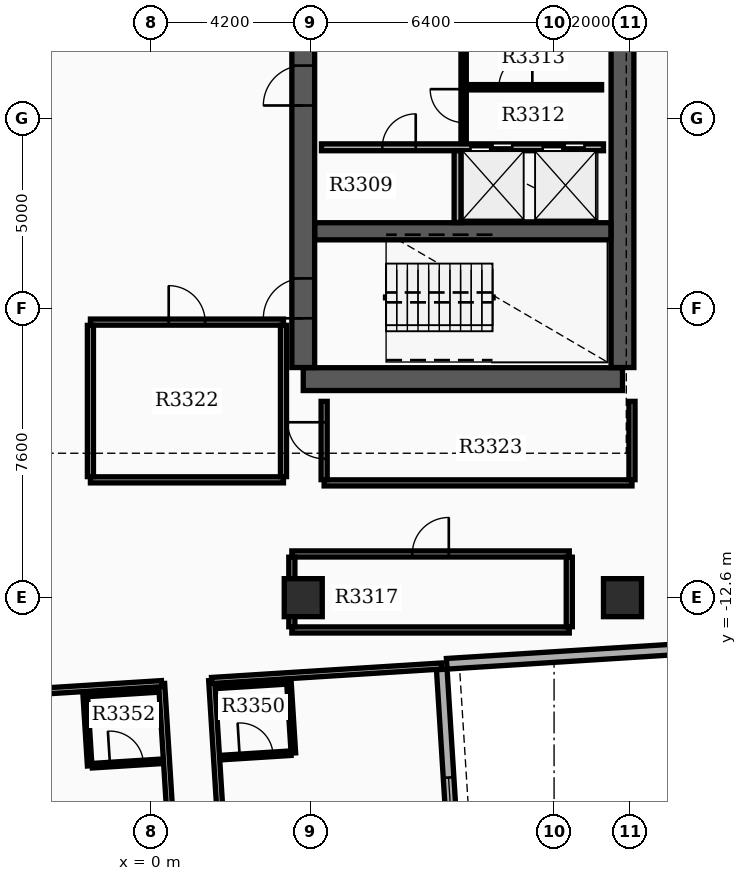
"""IFC4 building model, lengths in metres.
Left out: names, types, materials, properties, quantities, classifications, styles, units other than length and angle.
Written with IfcOpenShell. Run it as: python <this file> out.ifc"""

import sys

from ifc_helpers import new_model, si_unit, direction, frame, frame_2d, origin, origin_2d, place, context, subcontext, project, spatial, rectangle, extrude, element, fill, save


model = new_model("IFC4")
c1 = context("Model", 3, precision=1e-05, world=origin(), true_north=direction((0.0, 1.0)))
c2 = subcontext(c1, "Body", "Model", "MODEL_VIEW")
j1 = project(units=[si_unit("LENGTHUNIT", "METRE"), si_unit("PLANEANGLEUNIT", "RADIAN")], contexts=[c1])
p1 = place(None, origin())
s1 = spatial("IfcSite", under=j1, at=p1, CompositionType="ELEMENT")
p2 = place(p1, origin())
s2 = spatial("IfcBuilding", under=s1, at=p2, CompositionType="ELEMENT")
p3 = place(p2, frame((0.0, 0.0, 209.1)))
s3 = spatial("IfcBuildingStorey", under=s2, at=p3, CompositionType="ELEMENT", Elevation=209.1)
p4 = place(p3, frame((4.0, -6.85, 0.0), z_axis=(0.0, 0.0, 1.0), x_axis=(1.0, 0.0, 0.0)))
e1 = element("IfcWall", 1, at=p4, inside=s3, PredefinedType="SHEAR", context=c2, shape_type="SweptSolid", body=[
    extrude(rectangle(XDim=8.4, YDim=0.6, at=frame_2d((4.2, 0.0))), origin(), (0.0, 0.0, 1.0), 3.7),
])
p5 = place(p3, frame((4.0, -6.545, 0.0), z_axis=(0.0, 0.0, 1.0), x_axis=(0.0, 1.0, 0.0)))
e2 = element("IfcWall", 2, at=p5, inside=s3, PredefinedType="SHEAR", context=c2, shape_type="SweptSolid", body=[
    extrude(rectangle(XDim=11.19, YDim=0.6, at=frame_2d((5.595, 0.0))), origin(), (0.0, 0.0, 1.0), 3.7),
])
p6 = place(p5, frame((1.295, 0.0, 0.0)))
e3 = element("IfcOpeningElement", 3, at=p6, cuts=e2, PredefinedType="OPENING", context=c2, shape_type="SweptSolid", body=[
    extrude(rectangle(XDim=1.05, YDim=2.15, at=frame_2d((0.525, 1.075))), frame((0.0, 0.31, 0.0), z_axis=(0.0, -1.0, 0.0), x_axis=(1.0, 0.0, 0.0)), (0.0, 0.0, 1.0), 0.62),
])
p7 = place(p5, frame((6.895, 0.0, 0.0)))
e4 = element("IfcOpeningElement", 4, at=p7, cuts=e2, PredefinedType="OPENING", context=c2, shape_type="SweptSolid", body=[
    extrude(rectangle(XDim=1.05, YDim=2.15, at=frame_2d((0.525, 1.075))), frame((0.0, 0.31, 0.0), z_axis=(0.0, -1.0, 0.0), x_axis=(1.0, 0.0, 0.0)), (0.0, 0.0, 1.0), 0.62),
])
p8 = place(p3, frame((12.4, -6.545, 0.0), z_axis=(0.0, 0.0, 1.0), x_axis=(0.0, 1.0, 0.0)))
e5 = element("IfcWall", 5, at=p8, inside=s3, PredefinedType="SHEAR", context=c2, shape_type="SweptSolid", body=[
    extrude(rectangle(XDim=11.19, YDim=0.6, at=frame_2d((5.595, 0.0))), origin(), (0.0, 0.0, 1.0), 3.7),
])
p9 = place(p3, frame((4.305, -2.96, 0.0), z_axis=(0.0, 0.0, 1.0), x_axis=(1.0, 0.0, 0.0)))
e6 = element("IfcWall", 6, at=p9, inside=s3, PredefinedType="SHEAR", context=c2, shape_type="SweptSolid", body=[
    extrude(rectangle(XDim=7.79, YDim=0.45, at=frame_2d((3.895, 0.0))), origin(), (0.0, 0.0, 1.0), 3.7),
])
for number, where, z_axis, x_axis in (
    (7, (12.4, -12.6, 0.0), (0.0, 0.0, 1.0), (1.0, 0.0, 0.0)),
    (8, (4.0, -12.6, 0.0), (0.0, 0.0, 1.0), (1.0, 0.0, 0.0)),
):
    element("IfcColumn", number, at=place(p3, frame(where, z_axis=z_axis, x_axis=x_axis)), inside=s3, PredefinedType="COLUMN", context=c2, shape_type="SweptSolid", body=[
        extrude(rectangle(XDim=1.0, YDim=1.0, at=origin_2d()), origin(), (0.0, 0.0, 1.0), 3.9),
    ])
p10 = place(p3, frame((8.568, -29.16, 0.0), z_axis=(0.0, 0.0, 1.0), x_axis=(-0.062794967833, 0.998026448555, 0.0)))
e9 = element("IfcWall", 9, at=p10, inside=s3, PredefinedType="STANDARD", context=c2, shape_type="SweptSolid", body=[
    extrude(rectangle(XDim=14.7, YDim=0.28, at=frame_2d((7.35, 0.0))), origin(), (0.0, 0.0, 1.0), 3.18),
])
p11 = place(p10, frame((0.85, 0.0, 0.8)))
e10 = element("IfcOpeningElement", 10, at=p11, cuts=e9, PredefinedType="OPENING", context=c2, shape_type="SweptSolid", body=[
    extrude(rectangle(XDim=1.4, YDim=1.6, at=frame_2d((0.7, 0.8))), frame((0.0, 0.15, 0.0), z_axis=(0.0, -1.0, 0.0), x_axis=(1.0, 0.0, 0.0)), (0.0, 0.0, 1.0), 0.3),
])
p12 = place(p10, frame((4.05, 0.0, 0.8)))
e11 = element("IfcOpeningElement", 11, at=p12, cuts=e9, PredefinedType="OPENING", context=c2, shape_type="SweptSolid", body=[
    extrude(rectangle(XDim=1.4, YDim=1.6, at=frame_2d((0.7, 0.8))), frame((0.0, 0.15, 0.0), z_axis=(0.0, -1.0, 0.0), x_axis=(1.0, 0.0, 0.0)), (0.0, 0.0, 1.0), 0.3),
])
p13 = place(p10, frame((7.25, 0.0, 0.8)))
e12 = element("IfcOpeningElement", 12, at=p13, cuts=e9, PredefinedType="OPENING", context=c2, shape_type="SweptSolid", body=[
    extrude(rectangle(XDim=1.4, YDim=1.6, at=frame_2d((0.7, 0.8))), frame((0.0, 0.15, 0.0), z_axis=(0.0, -1.0, 0.0), x_axis=(1.0, 0.0, 0.0)), (0.0, 0.0, 1.0), 0.3),
])
p14 = place(p10, frame((10.45, 0.0, 0.8)))
e13 = element("IfcOpeningElement", 13, at=p14, cuts=e9, PredefinedType="OPENING", context=c2, shape_type="SweptSolid", body=[
    extrude(rectangle(XDim=1.4, YDim=1.6, at=frame_2d((0.7, 0.8))), frame((0.0, 0.15, 0.0), z_axis=(0.0, -1.0, 0.0), x_axis=(1.0, 0.0, 0.0)), (0.0, 0.0, 1.0), 0.3),
])
p15 = place(p3, frame((14.063, -13.945, 0.0), z_axis=(0.0, 0.0, 1.0), x_axis=(-0.998027314704, -0.062781200242, 0.0)))
e14 = element("IfcWall", 14, at=p15, inside=s3, PredefinedType="STANDARD", context=c2, shape_type="SweptSolid", body=[
    extrude(rectangle(XDim=6.3, YDim=0.28, at=frame_2d((3.15, 0.0))), origin(), (0.0, 0.0, 1.0), 3.18),
])
p16 = place(p3, frame((4.48, -0.75, 0.0), z_axis=(0.0, 0.0, 1.0), x_axis=(1.0, 0.0, 0.0)))
e15 = element("IfcWall", 15, at=p16, inside=s3, PredefinedType="SOLIDWALL", context=c2, shape_type="SweptSolid", body=[
    extrude(rectangle(XDim=7.42, YDim=0.18, at=frame_2d((3.71, 0.0))), origin(), (0.0, 0.0, 1.0), 3.17),
])
p17 = place(p16, frame((3.92, 0.0, 0.0)))
e16 = element("IfcOpeningElement", 16, at=p17, cuts=e15, PredefinedType="OPENING", context=c2, shape_type="SweptSolid", body=[
    extrude(rectangle(XDim=1.1, YDim=2.15, at=frame_2d((0.55, 1.075))), frame((0.0, 0.1, 0.0), z_axis=(0.0, -1.0, 0.0), x_axis=(1.0, 0.0, 0.0)), (0.0, 0.0, 1.0), 0.2),
])
p18 = place(p16, frame((5.82, 0.0, 0.0)))
e17 = element("IfcOpeningElement", 17, at=p18, cuts=e15, PredefinedType="OPENING", context=c2, shape_type="SweptSolid", body=[
    extrude(rectangle(XDim=1.1, YDim=2.15, at=frame_2d((0.55, 1.075))), frame((0.0, 0.1, 0.0), z_axis=(0.0, -1.0, 0.0), x_axis=(1.0, 0.0, 0.0)), (0.0, 0.0, 1.0), 0.2),
])
p19 = place(p16, frame((1.6, 0.0, 0.0)))
e18 = element("IfcOpeningElement", 18, at=p19, cuts=e15, PredefinedType="OPENING", context=c2, shape_type="SweptSolid", body=[
    extrude(rectangle(XDim=0.88, YDim=2.1, at=frame_2d((0.44, 1.05))), frame((0.0, 0.1, 0.0), z_axis=(0.0, -1.0, 0.0), x_axis=(1.0, 0.0, 0.0)), (0.0, 0.0, 1.0), 0.2),
])
p20 = place(p3, frame((8.06, -2.73, 0.0), z_axis=(0.0, 0.0, 1.0), x_axis=(0.0, 1.0, 0.0)))
e19 = element("IfcWall", 19, at=p20, inside=s3, PredefinedType="SOLIDWALL", context=c2, shape_type="SweptSolid", body=[
    extrude(rectangle(XDim=1.89, YDim=0.18, at=frame_2d((0.945, 0.0))), origin(), (0.0, 0.0, 1.0), 3.17),
])
p21 = place(p3, frame((8.22, -0.65, 0.0), z_axis=(0.0, 0.0, 1.0), x_axis=(0.0, 1.0, 0.0)))
e20 = element("IfcWall", 20, at=p21, inside=s3, PredefinedType="SOLIDWALL", context=c2, shape_type="SweptSolid", body=[
    extrude(rectangle(XDim=2.96, YDim=0.14, at=frame_2d((1.48, 0.0))), origin(), (0.0, 0.0, 1.0), 3.17),
])
p22 = place(p21, frame((0.55, 0.0, 0.0)))
e21 = element("IfcOpeningElement", 21, at=p22, cuts=e20, PredefinedType="OPENING", context=c2, shape_type="SweptSolid", body=[
    extrude(rectangle(XDim=0.88, YDim=2.1, at=frame_2d((0.44, 1.05))), frame((0.0, 0.08, 0.0), z_axis=(0.0, -1.0, 0.0), x_axis=(1.0, 0.0, 0.0)), (0.0, 0.0, 1.0), 0.16),
])
p23 = place(p3, frame((8.298, 0.83, 0.0), z_axis=(0.0, 0.0, 1.0), x_axis=(1.0, 0.0, 0.0)))
e22 = element("IfcWall", 22, at=p23, inside=s3, PredefinedType="PARTITIONING", context=c2, shape_type="SweptSolid", body=[
    extrude(rectangle(XDim=3.552, YDim=0.14, at=frame_2d((1.776, 0.0))), origin(), (0.0, 0.0, 1.0), 3.17),
])
p24 = place(p23, frame((0.85, 0.0, 0.0)))
e23 = element("IfcOpeningElement", 23, at=p24, cuts=e22, PredefinedType="OPENING", context=c2, shape_type="SweptSolid", body=[
    extrude(rectangle(XDim=0.88, YDim=2.1, at=frame_2d((0.44, 1.05))), frame((0.0, 0.08, 0.0), z_axis=(0.0, -1.0, 0.0), x_axis=(1.0, 0.0, 0.0)), (0.0, 0.0, 1.0), 0.16),
])
p25 = place(p3, frame((3.7, -13.45, 0.0), z_axis=(0.0, 0.0, 1.0), x_axis=(1.0, 0.0, 0.0)))
e24 = element("IfcWall", 24, at=p25, inside=s3, PredefinedType="PARTITIONING", context=c2, shape_type="SweptSolid", body=[
    extrude(rectangle(XDim=7.3, YDim=0.16, at=frame_2d((3.65, 0.0))), origin(), (0.0, 0.0, 1.0), 3.17),
])
p26 = place(p3, frame((3.7, -11.45, 0.0), z_axis=(0.0, 0.0, 1.0), x_axis=(1.0, 0.0, 0.0)))
e25 = element("IfcWall", 25, at=p26, inside=s3, PredefinedType="PARTITIONING", context=c2, shape_type="SweptSolid", body=[
    extrude(rectangle(XDim=7.3, YDim=0.16, at=frame_2d((3.65, 0.0))), origin(), (0.0, 0.0, 1.0), 3.17),
])
p27 = place(p26, frame((3.17, 0.0, 0.0)))
e26 = element("IfcOpeningElement", 26, at=p27, cuts=e25, PredefinedType="OPENING", context=c2, shape_type="SweptSolid", body=[
    extrude(rectangle(XDim=0.96, YDim=2.15, at=frame_2d((0.48, 1.075))), frame((0.0, 0.09, 0.0), z_axis=(0.0, -1.0, 0.0), x_axis=(1.0, 0.0, 0.0)), (0.0, 0.0, 1.0), 0.18),
])
for number, where, z_axis, x_axis in (
    (27, (3.7, -13.365, 0.0), (0.0, 0.0, 1.0), (0.0, 1.0, 0.0)),
    (28, (11.0, -13.365, 0.0), (0.0, 0.0, 1.0), (0.0, 1.0, 0.0)),
):
    element("IfcWall", number, at=place(p3, frame(where, z_axis=z_axis, x_axis=x_axis)), inside=s3, PredefinedType="PARTITIONING", context=c2, shape_type="SweptSolid", body=[
        extrude(rectangle(XDim=1.83, YDim=0.16, at=frame_2d((0.915, 0.0))), origin(), (0.0, 0.0, 1.0), 3.17),
    ])
p28 = place(p3, frame((-1.6, -9.5, 0.0), z_axis=(0.0, 0.0, 1.0), x_axis=(1.0, 0.0, 0.0)))
e29 = element("IfcWall", 29, at=p28, inside=s3, PredefinedType="PARTITIONING", context=c2, shape_type="SweptSolid", body=[
    extrude(rectangle(XDim=5.08, YDim=0.16, at=frame_2d((2.54, 0.0))), origin(), (0.0, 0.0, 1.0), 3.17),
])
p29 = place(p3, frame((-1.6, -5.35, 0.0), z_axis=(0.0, 0.0, 1.0), x_axis=(1.0, 0.0, 0.0)))
e30 = element("IfcWall", 30, at=p29, inside=s3, PredefinedType="PARTITIONING", context=c2, shape_type="SweptSolid", body=[
    extrude(rectangle(XDim=5.08, YDim=0.16, at=frame_2d((2.54, 0.0))), origin(), (0.0, 0.0, 1.0), 3.17),
])
p30 = place(p29, frame((2.06, 0.0, 0.0)))
e31 = element("IfcOpeningElement", 31, at=p30, cuts=e30, PredefinedType="OPENING", context=c2, shape_type="SweptSolid", body=[
    extrude(rectangle(XDim=0.96, YDim=2.15, at=frame_2d((0.48, 1.075))), frame((0.0, 0.09, 0.0), z_axis=(0.0, -1.0, 0.0), x_axis=(1.0, 0.0, 0.0)), (0.0, 0.0, 1.0), 0.18),
])
for number, where, z_axis, x_axis in (
    (32, (-1.6, -9.415, 0.0), (0.0, 0.0, 1.0), (0.0, 1.0, 0.0)),
    (33, (3.48, -9.415, 0.0), (0.0, 0.0, 1.0), (0.0, 1.0, 0.0)),
):
    element("IfcWall", number, at=place(p3, frame(where, z_axis=z_axis, x_axis=x_axis)), inside=s3, PredefinedType="PARTITIONING", context=c2, shape_type="SweptSolid", body=[
        extrude(rectangle(XDim=3.98, YDim=0.16, at=frame_2d((1.99, 0.0))), origin(), (0.0, 0.0, 1.0), 3.17),
    ])
p31 = place(p3, frame((4.55, -9.58, 0.0), z_axis=(0.0, 0.0, 1.0), x_axis=(1.0, 0.0, 0.0)))
e34 = element("IfcWall", 34, at=p31, inside=s3, PredefinedType="PARTITIONING", context=c2, shape_type="SweptSolid", body=[
    extrude(rectangle(XDim=8.1, YDim=0.16, at=frame_2d((4.05, 0.0))), origin(), (0.0, 0.0, 1.0), 3.17),
])
p32 = place(p3, frame((4.55, -9.495, 0.0), z_axis=(0.0, 0.0, 1.0), x_axis=(0.0, 1.0, 0.0)))
e35 = element("IfcWall", 35, at=p32, inside=s3, PredefinedType="PARTITIONING", context=c2, shape_type="SweptSolid", body=[
    extrude(rectangle(XDim=2.06, YDim=0.16, at=frame_2d((1.03, 0.0))), origin(), (0.0, 0.0, 1.0), 3.17),
])
p33 = place(p32, frame((0.55, 0.0, 0.0)))
e36 = element("IfcOpeningElement", 36, at=p33, cuts=e35, PredefinedType="OPENING", context=c2, shape_type="SweptSolid", body=[
    extrude(rectangle(XDim=0.96, YDim=2.15, at=frame_2d((0.48, 1.075))), frame((0.0, 0.09, 0.0), z_axis=(0.0, -1.0, 0.0), x_axis=(1.0, 0.0, 0.0)), (0.0, 0.0, 1.0), 0.18),
])
p34 = place(p3, frame((12.65, -9.495, 0.0), z_axis=(0.0, 0.0, 1.0), x_axis=(0.0, 1.0, 0.0)))
e37 = element("IfcWall", 37, at=p34, inside=s3, PredefinedType="PARTITIONING", context=c2, shape_type="SweptSolid", body=[
    extrude(rectangle(XDim=2.06, YDim=0.16, at=frame_2d((1.03, 0.0))), origin(), (0.0, 0.0, 1.0), 3.17),
])
p35 = place(p3, frame((1.591, -14.779, 0.0), z_axis=(0.0, 0.0, 1.0), x_axis=(0.062794721174, -0.998026464074, 0.0)))
e38 = element("IfcWall", 38, at=p35, inside=s3, PredefinedType="PARTITIONING", context=c2, shape_type="SweptSolid", body=[
    extrude(rectangle(XDim=14.782, YDim=0.16, at=frame_2d((7.391, 0.0))), origin(), (0.0, 0.0, 1.0), 3.17),
])
p36 = place(p35, frame((13.53, 0.0, 0.0)))
e39 = element("IfcOpeningElement", 39, at=p36, cuts=e38, PredefinedType="OPENING", context=c2, shape_type="SweptSolid", body=[
    extrude(rectangle(XDim=0.96, YDim=2.15, at=frame_2d((0.48, 1.075))), frame((0.0, 0.09, 0.0), z_axis=(0.0, -1.0, 0.0), x_axis=(1.0, 0.0, 0.0)), (0.0, 0.0, 1.0), 0.18),
])
p37 = place(p3, frame((1.591, -14.779, 0.0), z_axis=(0.0, 0.0, 1.0), x_axis=(0.998025680695, 0.062807170557, 0.0)))
e40 = element("IfcWall", 40, at=p37, inside=s3, PredefinedType="PARTITIONING", context=c2, shape_type="SweptSolid", body=[
    extrude(rectangle(XDim=6.06, YDim=0.16, at=frame_2d((3.03, 0.0))), origin(), (0.0, 0.0, 1.0), 3.17),
])
p38 = place(p3, frame((1.859, -16.806, 0.0), z_axis=(0.0, 0.0, 1.0), x_axis=(0.998027443946, 0.062779145668, 0.0)))
e41 = element("IfcWall", 41, at=p38, inside=s3, PredefinedType="PARTITIONING", context=c2, shape_type="SweptSolid", body=[
    extrude(rectangle(XDim=1.82, YDim=0.12, at=frame_2d((0.91, 0.0))), origin(), (0.0, 0.0, 1.0), 3.17),
])
p39 = place(p38, frame((0.47, 0.0, 0.0)))
e42 = element("IfcOpeningElement", 42, at=p39, cuts=e41, PredefinedType="OPENING", context=c2, shape_type="SweptSolid", body=[
    extrude(rectangle(XDim=0.88, YDim=2.1, at=frame_2d((0.44, 1.05))), frame((0.0, 0.07, 0.0), z_axis=(0.0, -1.0, 0.0), x_axis=(1.0, 0.0, 0.0)), (0.0, 0.0, 1.0), 0.14),
])
p40 = place(p3, frame((1.741, -14.93, 0.0), z_axis=(0.0, 0.0, 1.0), x_axis=(0.998027443946, 0.062779145668, 0.0)))
e43 = element("IfcWall", 43, at=p40, inside=s3, PredefinedType="PARTITIONING", context=c2, shape_type="SweptSolid", body=[
    extrude(rectangle(XDim=1.82, YDim=0.12, at=frame_2d((0.91, 0.0))), origin(), (0.0, 0.0, 1.0), 3.17),
])
p41 = place(p3, frame((3.622, -14.812, 0.0), z_axis=(0.0, 0.0, 1.0), x_axis=(0.062725942896, -0.998030789148, 0.0)))
e44 = element("IfcWall", 44, at=p41, inside=s3, PredefinedType="PARTITIONING", context=c2, shape_type="SweptSolid", body=[
    extrude(rectangle(XDim=1.88, YDim=0.12, at=frame_2d((0.94, 0.0))), origin(), (0.0, 0.0, 1.0), 3.17),
])
p42 = place(p3, frame((0.274, -14.862, 0.0), z_axis=(0.0, 0.0, 1.0), x_axis=(0.062793686106, -0.998026529199, 0.0)))
e45 = element("IfcWall", 45, at=p42, inside=s3, PredefinedType="PARTITIONING", context=c2, shape_type="SweptSolid", body=[
    extrude(rectangle(XDim=14.782, YDim=0.16, at=frame_2d((7.391, 0.0))), origin(), (0.0, 0.0, 1.0), 3.17),
])
p43 = place(p42, frame((13.53, 0.0, 0.0)))
e46 = element("IfcOpeningElement", 46, at=p43, cuts=e45, PredefinedType="OPENING", context=c2, shape_type="SweptSolid", body=[
    extrude(rectangle(XDim=0.96, YDim=2.15, at=frame_2d((0.48, 1.075))), frame((0.0, 0.09, 0.0), z_axis=(0.0, -1.0, 0.0), x_axis=(1.0, 0.0, 0.0)), (0.0, 0.0, 1.0), 0.18),
])
p44 = place(p3, frame((0.274, -14.862, 0.0), z_axis=(0.0, 0.0, 1.0), x_axis=(-0.998025680695, -0.062807170557, 0.0)))
e47 = element("IfcWall", 47, at=p44, inside=s3, PredefinedType="PARTITIONING", context=c2, shape_type="SweptSolid", body=[
    extrude(rectangle(XDim=6.06, YDim=0.16, at=frame_2d((3.03, 0.0))), origin(), (0.0, 0.0, 1.0), 3.17),
])
p45 = place(p3, frame((-1.554, -17.021, 0.0), z_axis=(0.0, 0.0, 1.0), x_axis=(0.998027443946, 0.062779145668, 0.0)))
e48 = element("IfcWall", 48, at=p45, inside=s3, PredefinedType="PARTITIONING", context=c2, shape_type="SweptSolid", body=[
    extrude(rectangle(XDim=1.82, YDim=0.12, at=frame_2d((0.91, 0.0))), origin(), (0.0, 0.0, 1.0), 3.17),
])
p46 = place(p45, frame((0.47, 0.0, 0.0)))
e49 = element("IfcOpeningElement", 49, at=p46, cuts=e48, PredefinedType="OPENING", context=c2, shape_type="SweptSolid", body=[
    extrude(rectangle(XDim=0.88, YDim=2.1, at=frame_2d((0.44, 1.05))), frame((0.0, 0.07, 0.0), z_axis=(0.0, -1.0, 0.0), x_axis=(1.0, 0.0, 0.0)), (0.0, 0.0, 1.0), 0.14),
])
p47 = place(p3, frame((-1.672, -15.145, 0.0), z_axis=(0.0, 0.0, 1.0), x_axis=(0.998019030272, 0.062912758763, 0.0)))
e50 = element("IfcWall", 50, at=p47, inside=s3, PredefinedType="PARTITIONING", context=c2, shape_type="SweptSolid", body=[
    extrude(rectangle(XDim=1.82, YDim=0.12, at=frame_2d((0.91, 0.0))), origin(), (0.0, 0.0, 1.0), 3.17),
])
p48 = place(p3, frame((-1.737, -15.149, 0.0), z_axis=(0.0, 0.0, 1.0), x_axis=(0.062847152131, -0.998023163794, 0.0)))
e51 = element("IfcWall", 51, at=p48, inside=s3, PredefinedType="PARTITIONING", context=c2, shape_type="SweptSolid", body=[
    extrude(rectangle(XDim=1.88, YDim=0.12, at=frame_2d((0.94, 0.0))), origin(), (0.0, 0.0, 1.0), 3.17),
])
p49 = place(p14, origin())
e52 = element("IfcWindow", 52, at=p49, inside=s3, PartitioningType="SINGLE_PANEL", PredefinedType="WINDOW", context=c2, shape_type="SweptSolid", body=[
    extrude(rectangle(XDim=1.4, YDim=1.6, at=frame_2d((0.7, 0.8))), frame((0.0, 0.03, 0.0), z_axis=(0.0, -1.0, 0.0), x_axis=(1.0, 0.0, 0.0)), (0.0, 0.0, 1.0), 0.06),
])
fill(e13, e52)
p50 = place(p6, origin())
e53 = element("IfcDoor", 53, at=p50, inside=s3, OperationType="SINGLE_SWING_LEFT", PredefinedType="DOOR", context=c2, shape_type="SweptSolid", body=[
    extrude(rectangle(XDim=1.05, YDim=2.15, at=frame_2d((0.525, 1.075))), frame((0.0, 0.025, 0.0), z_axis=(0.0, -1.0, 0.0), x_axis=(1.0, 0.0, 0.0)), (0.0, 0.0, 1.0), 0.05),
])
fill(e3, e53)
p51 = place(p7, origin())
e54 = element("IfcDoor", 54, at=p51, inside=s3, OperationType="SINGLE_SWING_LEFT", PredefinedType="DOOR", context=c2, shape_type="SweptSolid", body=[
    extrude(rectangle(XDim=1.05, YDim=2.15, at=frame_2d((0.525, 1.075))), frame((0.0, 0.025, 0.0), z_axis=(0.0, -1.0, 0.0), x_axis=(1.0, 0.0, 0.0)), (0.0, 0.0, 1.0), 0.05),
])
fill(e4, e54)
p52 = place(p17, origin())
e55 = element("IfcDoor", 55, at=p52, inside=s3, OperationType="DOUBLE_DOOR_SLIDING", PredefinedType="DOOR", context=c2, shape_type="SweptSolid", body=[
    extrude(rectangle(XDim=1.1, YDim=2.15, at=frame_2d((0.55, 1.075))), frame((0.0, 0.025, 0.0), z_axis=(0.0, -1.0, 0.0), x_axis=(1.0, 0.0, 0.0)), (0.0, 0.0, 1.0), 0.05),
])
fill(e16, e55)
p53 = place(p18, origin())
e56 = element("IfcDoor", 56, at=p53, inside=s3, OperationType="DOUBLE_DOOR_SLIDING", PredefinedType="DOOR", context=c2, shape_type="SweptSolid", body=[
    extrude(rectangle(XDim=1.1, YDim=2.15, at=frame_2d((0.55, 1.075))), frame((0.0, 0.025, 0.0), z_axis=(0.0, -1.0, 0.0), x_axis=(1.0, 0.0, 0.0)), (0.0, 0.0, 1.0), 0.05),
])
fill(e17, e56)
p54 = place(p19, origin())
e57 = element("IfcDoor", 57, at=p54, inside=s3, OperationType="SINGLE_SWING_RIGHT", PredefinedType="DOOR", context=c2, shape_type="SweptSolid", body=[
    extrude(rectangle(XDim=0.88, YDim=2.1, at=frame_2d((0.44, 1.05))), frame((0.0, 0.025, 0.0), z_axis=(0.0, -1.0, 0.0), x_axis=(1.0, 0.0, 0.0)), (0.0, 0.0, 1.0), 0.05),
])
fill(e18, e57)
p55 = place(p22, origin())
e58 = element("IfcDoor", 58, at=p55, inside=s3, OperationType="SINGLE_SWING_RIGHT", PredefinedType="DOOR", context=c2, shape_type="SweptSolid", body=[
    extrude(rectangle(XDim=0.88, YDim=2.1, at=frame_2d((0.44, 1.05))), frame((0.0, 0.025, 0.0), z_axis=(0.0, -1.0, 0.0), x_axis=(1.0, 0.0, 0.0)), (0.0, 0.0, 1.0), 0.05),
])
fill(e21, e58)
p56 = place(p24, origin())
e59 = element("IfcDoor", 59, at=p56, inside=s3, OperationType="SINGLE_SWING_RIGHT", PredefinedType="DOOR", context=c2, shape_type="SweptSolid", body=[
    extrude(rectangle(XDim=0.88, YDim=2.1, at=frame_2d((0.44, 1.05))), frame((0.0, 0.025, 0.0), z_axis=(0.0, -1.0, 0.0), x_axis=(1.0, 0.0, 0.0)), (0.0, 0.0, 1.0), 0.05),
])
fill(e23, e59)
p57 = place(p27, origin())
e60 = element("IfcDoor", 60, at=p57, inside=s3, OperationType="SINGLE_SWING_RIGHT", PredefinedType="DOOR", context=c2, shape_type="SweptSolid", body=[
    extrude(rectangle(XDim=0.96, YDim=2.15, at=frame_2d((0.48, 1.075))), frame((0.0, 0.025, 0.0), z_axis=(0.0, -1.0, 0.0), x_axis=(1.0, 0.0, 0.0)), (0.0, 0.0, 1.0), 0.05),
])
fill(e26, e60)
p58 = place(p30, origin())
e61 = element("IfcDoor", 61, at=p58, inside=s3, OperationType="SINGLE_SWING_LEFT", PredefinedType="DOOR", context=c2, shape_type="SweptSolid", body=[
    extrude(rectangle(XDim=0.96, YDim=2.15, at=frame_2d((0.48, 1.075))), frame((0.0, 0.025, 0.0), z_axis=(0.0, -1.0, 0.0), x_axis=(1.0, 0.0, 0.0)), (0.0, 0.0, 1.0), 0.05),
])
fill(e31, e61)
p59 = place(p33, origin())
e62 = element("IfcDoor", 62, at=p59, inside=s3, OperationType="SINGLE_SWING_RIGHT", PredefinedType="DOOR", context=c2, shape_type="SweptSolid", body=[
    extrude(rectangle(XDim=0.96, YDim=2.15, at=frame_2d((0.48, 1.075))), frame((0.0, 0.025, 0.0), z_axis=(0.0, -1.0, 0.0), x_axis=(1.0, 0.0, 0.0)), (0.0, 0.0, 1.0), 0.05),
])
fill(e36, e62)
p60 = place(p39, origin())
e63 = element("IfcDoor", 63, at=p60, inside=s3, OperationType="SINGLE_SWING_LEFT", PredefinedType="DOOR", context=c2, shape_type="SweptSolid", body=[
    extrude(rectangle(XDim=0.88, YDim=2.1, at=frame_2d((0.44, 1.05))), frame((0.0, 0.025, 0.0), z_axis=(0.0, -1.0, 0.0), x_axis=(1.0, 0.0, 0.0)), (0.0, 0.0, 1.0), 0.05),
])
fill(e42, e63)
p61 = place(p46, origin())
e64 = element("IfcDoor", 64, at=p61, inside=s3, OperationType="SINGLE_SWING_LEFT", PredefinedType="DOOR", context=c2, shape_type="SweptSolid", body=[
    extrude(rectangle(XDim=0.88, YDim=2.1, at=frame_2d((0.44, 1.05))), frame((0.0, 0.025, 0.0), z_axis=(0.0, -1.0, 0.0), x_axis=(1.0, 0.0, 0.0)), (0.0, 0.0, 1.0), 0.05),
])
fill(e49, e64)
save(model, sys.argv[1])
